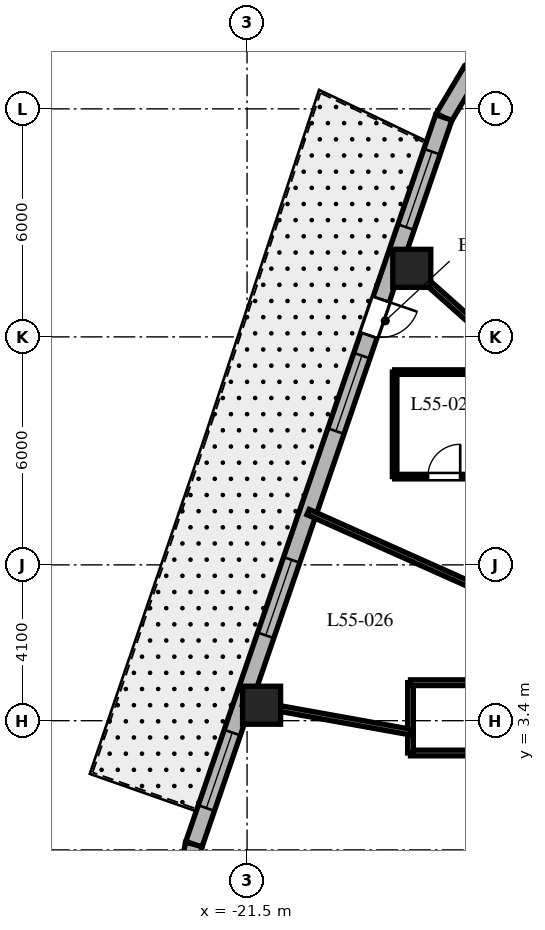
"""IFC4 building model, lengths in metres.
Left out: names, types, materials, properties, quantities, classifications, styles, units other than length and angle.
Written with IfcOpenShell. Run it as: python <this file> out.ifc"""

import sys

from ifc_helpers import new_model, si_unit, direction, frame, frame_2d, origin, origin_2d, place, context, subcontext, project, spatial, rectangle, extrude, element, fill, save


model = new_model("IFC4")
c1 = context("Model", 3, precision=1e-05, world=origin(), true_north=direction((0.0, 1.0)))
c2 = subcontext(c1, "Body", "Model", "MODEL_VIEW")
j1 = project(units=[si_unit("LENGTHUNIT", "METRE"), si_unit("PLANEANGLEUNIT", "RADIAN")], contexts=[c1])
p1 = place(None, origin())
s1 = spatial("IfcSite", under=j1, at=p1, CompositionType="ELEMENT")
p2 = place(p1, origin())
s2 = spatial("IfcBuilding", under=s1, at=p2, CompositionType="ELEMENT")
p3 = place(p2, frame((0.0, 0.0, 221.7)))
s3 = spatial("IfcBuildingStorey", under=s2, at=p3, CompositionType="ELEMENT", Elevation=221.7)
for number, where, z_axis, x_axis in (
    (1, (-17.166, 15.304, 0.0), (0.0, 0.0, 1.0), (1.0, 0.0, 0.0)),
    (2, (-21.118, 3.807, 0.0), (0.0, 0.0, 1.0), (1.0, 0.0, 0.0)),
):
    element("IfcColumn", number, at=place(p3, frame(where, z_axis=z_axis, x_axis=x_axis)), inside=s3, PredefinedType="COLUMN", context=c2, shape_type="SweptSolid", body=[
        extrude(rectangle(XDim=1.0, YDim=1.0, at=origin_2d()), origin(), (0.0, 0.0, 1.0), 3.8),
    ])
p4 = place(p3, frame((-15.604, 20.483, 0.0), z_axis=(0.0, 0.0, 1.0), x_axis=(-0.512222149036, -0.858852996756, 0.0)))
e3 = element("IfcWall", 3, at=p4, inside=s3, PredefinedType="SOLIDWALL", context=c2, shape_type="SweptSolid", body=[
    extrude(rectangle(XDim=1.406, YDim=0.45, at=frame_2d((0.703, 0.0))), origin(), (0.0, 0.0, 1.0), 3.5),
])
p5 = place(p3, frame((-22.898, 0.15, 0.0), z_axis=(0.0, 0.0, 1.0), x_axis=(-0.199055826889, -0.979988151858, 0.0)))
e4 = element("IfcWall", 4, at=p5, inside=s3, PredefinedType="SOLIDWALL", context=c2, shape_type="SweptSolid", body=[
    extrude(rectangle(XDim=0.894, YDim=0.45, at=frame_2d((0.447, 0.0))), origin(), (0.0, 0.0, 1.0), 3.5),
])
p6 = place(p3, frame((-16.324, 19.275, 0.0), z_axis=(0.0, 0.0, 1.0), x_axis=(-0.325083142304, -0.945685439557, 0.0)))
e5 = element("IfcWall", 5, at=p6, inside=s3, PredefinedType="SOLIDWALL", context=c2, shape_type="SweptSolid", body=[
    extrude(rectangle(XDim=20.224, YDim=0.45, at=frame_2d((10.112, 0.0))), origin(), (0.0, 0.0, 1.0), 3.5),
])
p7 = place(p6, frame((5.062, 0.0, 0.0)))
e6 = element("IfcOpeningElement", 6, at=p7, cuts=e5, PredefinedType="OPENING", context=c2, shape_type="SweptSolid", body=[
    extrude(rectangle(XDim=1.0, YDim=2.15, at=frame_2d((0.5, 1.075))), frame((0.0, 0.235, 0.0), z_axis=(0.0, -1.0, 0.0), x_axis=(1.0, 0.0, 0.0)), (0.0, 0.0, 1.0), 0.47),
])
p8 = place(p6, frame((0.953, 0.0, 0.8)))
e7 = element("IfcOpeningElement", 7, at=p8, cuts=e5, PredefinedType="OPENING", context=c2, shape_type="SweptSolid", body=[
    extrude(rectangle(XDim=2.1, YDim=1.85, at=frame_2d((1.05, 0.925))), frame((0.0, 0.235, 0.0), z_axis=(0.0, -1.0, 0.0), x_axis=(1.0, 0.0, 0.0)), (0.0, 0.0, 1.0), 0.47),
])
p9 = place(p6, frame((6.629, 0.0, 0.8)))
e8 = element("IfcOpeningElement", 8, at=p9, cuts=e5, PredefinedType="OPENING", context=c2, shape_type="SweptSolid", body=[
    extrude(rectangle(XDim=2.1, YDim=1.85, at=frame_2d((1.05, 0.925))), frame((0.0, 0.235, 0.0), z_axis=(0.0, -1.0, 0.0), x_axis=(1.0, 0.0, 0.0)), (0.0, 0.0, 1.0), 0.47),
])
p10 = place(p6, frame((12.312, 0.0, 0.8)))
e9 = element("IfcOpeningElement", 9, at=p10, cuts=e5, PredefinedType="OPENING", context=c2, shape_type="SweptSolid", body=[
    extrude(rectangle(XDim=2.1, YDim=1.85, at=frame_2d((1.05, 0.925))), frame((0.0, 0.235, 0.0), z_axis=(0.0, -1.0, 0.0), x_axis=(1.0, 0.0, 0.0)), (0.0, 0.0, 1.0), 0.47),
])
p11 = place(p6, frame((17.118, 0.0, 0.8)))
e10 = element("IfcOpeningElement", 10, at=p11, cuts=e5, PredefinedType="OPENING", context=c2, shape_type="SweptSolid", body=[
    extrude(rectangle(XDim=2.1, YDim=1.85, at=frame_2d((1.05, 0.925))), frame((0.0, 0.235, 0.0), z_axis=(0.0, -1.0, 0.0), x_axis=(1.0, 0.0, 0.0)), (0.0, 0.0, 1.0), 0.47),
])
p12 = place(p3, frame((-11.35, 2.55, 0.0), z_axis=(0.0, 0.0, 1.0), x_axis=(-1.0, 0.0, 0.0)))
e11 = element("IfcWall", 11, at=p12, inside=s3, PredefinedType="PARTITIONING", context=c2, shape_type="SweptSolid", body=[
    extrude(rectangle(XDim=5.85, YDim=0.15, at=frame_2d((2.925, 0.0))), origin(), (0.0, 0.0, 1.0), 2.94),
])
p13 = place(p3, frame((-17.2, 2.55, 0.0), z_axis=(0.0, 0.0, 1.0), x_axis=(0.0, 1.0, 0.0)))
e12 = element("IfcWall", 12, at=p13, inside=s3, PredefinedType="PARTITIONING", context=c2, shape_type="SweptSolid", body=[
    extrude(rectangle(XDim=1.85, YDim=0.15, at=frame_2d((0.925, 0.0))), origin(), (0.0, 0.0, 1.0), 2.94),
])
p14 = place(p3, frame((-17.2, 4.4, 0.0), z_axis=(0.0, 0.0, 1.0), x_axis=(1.0, 0.0, 0.0)))
e13 = element("IfcWall", 13, at=p14, inside=s3, PredefinedType="PARTITIONING", context=c2, shape_type="SweptSolid", body=[
    extrude(rectangle(XDim=5.85, YDim=0.15, at=frame_2d((2.925, 0.0))), origin(), (0.0, 0.0, 1.0), 2.94),
])
p15 = place(p14, frame((2.475, 0.0, 0.0)))
e14 = element("IfcOpeningElement", 14, at=p15, cuts=e13, PredefinedType="OPENING", context=c2, shape_type="SweptSolid", body=[
    extrude(rectangle(XDim=0.9, YDim=2.03, at=frame_2d((0.45, 1.015))), frame((0.0, 0.085, 0.0), z_axis=(0.0, -1.0, 0.0), x_axis=(1.0, 0.0, 0.0)), (0.0, 0.0, 1.0), 0.17),
])
p16 = place(p3, frame((-11.048, 9.85, 0.0), z_axis=(0.0, 0.0, 1.0), x_axis=(-0.746444434655, 0.665447748492, 0.0)))
e15 = element("IfcWall", 15, at=p16, inside=s3, PredefinedType="PARTITIONING", context=c2, shape_type="SweptSolid", body=[
    extrude(rectangle(XDim=8.732, YDim=0.15, at=frame_2d((4.366, 0.0))), origin(), (0.0, 0.0, 1.0), 2.74),
])
p17 = place(p3, frame((-11.35, 5.072, 0.0), z_axis=(0.0, 0.0, 1.0), x_axis=(-0.912980177983, 0.408003914944, 0.0)))
e16 = element("IfcWall", 16, at=p17, inside=s3, PredefinedType="PARTITIONING", context=c2, shape_type="SweptSolid", body=[
    extrude(rectangle(XDim=9.358, YDim=0.15, at=frame_2d((4.679, 0.0))), origin(), (0.0, 0.0, 1.0), 2.74),
])
p18 = place(p3, frame((-17.2, 3.101, 0.0), z_axis=(0.0, 0.0, 1.0), x_axis=(-0.98413465883, 0.177423147559, 0.0)))
e17 = element("IfcWall", 17, at=p18, inside=s3, PredefinedType="PARTITIONING", context=c2, shape_type="SweptSolid", body=[
    extrude(rectangle(XDim=4.482, YDim=0.15, at=frame_2d((2.241, 0.0))), origin(), (0.0, 0.0, 1.0), 2.74),
])
p19 = place(p3, frame((-17.617, 9.823, 0.0), z_axis=(0.0, 0.0, 1.0), x_axis=(1.0, 0.0, 0.0)))
e18 = element("IfcWall", 18, at=p19, inside=s3, PredefinedType="PARTITIONING", context=c2, shape_type="SweptSolid", body=[
    extrude(rectangle(XDim=2.6, YDim=0.12, at=frame_2d((1.3, 0.0))), origin(), (0.0, 0.0, 1.0), 3.073),
])
p20 = place(p19, frame((0.875, 0.0, 0.0)))
e19 = element("IfcOpeningElement", 19, at=p20, cuts=e18, PredefinedType="OPENING", context=c2, shape_type="SweptSolid", body=[
    extrude(rectangle(XDim=0.85, YDim=2.03, at=frame_2d((0.425, 1.015))), frame((0.0, 0.07, 0.0), z_axis=(0.0, -1.0, 0.0), x_axis=(1.0, 0.0, 0.0)), (0.0, 0.0, 1.0), 0.14),
])
p21 = place(p3, frame((-15.017, 12.573, 0.0), z_axis=(0.0, 0.0, 1.0), x_axis=(-1.0, 0.0, 0.0)))
e20 = element("IfcWall", 20, at=p21, inside=s3, PredefinedType="PARTITIONING", context=c2, shape_type="SweptSolid", body=[
    extrude(rectangle(XDim=2.6, YDim=0.12, at=frame_2d((1.3, 0.0))), origin(), (0.0, 0.0, 1.0), 3.5),
])
p22 = place(p3, frame((-17.617, 12.573, 0.0), z_axis=(0.0, 0.0, 1.0), x_axis=(0.0, -1.0, 0.0)))
e21 = element("IfcWall", 21, at=p22, inside=s3, PredefinedType="PARTITIONING", context=c2, shape_type="SweptSolid", body=[
    extrude(rectangle(XDim=2.75, YDim=0.12, at=frame_2d((1.375, 0.0))), origin(), (0.0, 0.0, 1.0), 3.5),
])
p23 = place(p7, origin())
e22 = element("IfcDoor", 22, at=p23, inside=s3, OperationType="SINGLE_SWING_LEFT", PredefinedType="DOOR", context=c2, shape_type="SweptSolid", body=[
    extrude(rectangle(XDim=1.0, YDim=2.15, at=frame_2d((0.5, 1.075))), frame((0.0, 0.025, 0.0), z_axis=(0.0, -1.0, 0.0), x_axis=(1.0, 0.0, 0.0)), (0.0, 0.0, 1.0), 0.05),
])
fill(e6, e22)
p24 = place(p8, origin())
e23 = element("IfcWindow", 23, at=p24, inside=s3, PartitioningType="SINGLE_PANEL", PredefinedType="WINDOW", context=c2, shape_type="SweptSolid", body=[
    extrude(rectangle(XDim=2.1, YDim=1.85, at=frame_2d((1.05, 0.925))), frame((0.0, 0.03, 0.0), z_axis=(0.0, -1.0, 0.0), x_axis=(1.0, 0.0, 0.0)), (0.0, 0.0, 1.0), 0.06),
])
fill(e7, e23)
p25 = place(p9, origin())
e24 = element("IfcWindow", 24, at=p25, inside=s3, PartitioningType="SINGLE_PANEL", PredefinedType="WINDOW", context=c2, shape_type="SweptSolid", body=[
    extrude(rectangle(XDim=2.1, YDim=1.85, at=frame_2d((1.05, 0.925))), frame((0.0, 0.03, 0.0), z_axis=(0.0, -1.0, 0.0), x_axis=(1.0, 0.0, 0.0)), (0.0, 0.0, 1.0), 0.06),
])
fill(e8, e24)
p26 = place(p10, origin())
e25 = element("IfcWindow", 25, at=p26, inside=s3, PartitioningType="SINGLE_PANEL", PredefinedType="WINDOW", context=c2, shape_type="SweptSolid", body=[
    extrude(rectangle(XDim=2.1, YDim=1.85, at=frame_2d((1.05, 0.925))), frame((0.0, 0.03, 0.0), z_axis=(0.0, -1.0, 0.0), x_axis=(1.0, 0.0, 0.0)), (0.0, 0.0, 1.0), 0.06),
])
fill(e9, e25)
p27 = place(p11, origin())
e26 = element("IfcWindow", 26, at=p27, inside=s3, PartitioningType="SINGLE_PANEL", PredefinedType="WINDOW", context=c2, shape_type="SweptSolid", body=[
    extrude(rectangle(XDim=2.1, YDim=1.85, at=frame_2d((1.05, 0.925))), frame((0.0, 0.03, 0.0), z_axis=(0.0, -1.0, 0.0), x_axis=(1.0, 0.0, 0.0)), (0.0, 0.0, 1.0), 0.06),
])
fill(e10, e26)
p28 = place(p20, origin())
e27 = element("IfcDoor", 27, at=p28, inside=s3, OperationType="SINGLE_SWING_RIGHT", PredefinedType="DOOR", context=c2, shape_type="SweptSolid", body=[
    extrude(rectangle(XDim=0.85, YDim=2.03, at=frame_2d((0.425, 1.015))), frame((0.0, 0.025, 0.0), z_axis=(0.0, -1.0, 0.0), x_axis=(1.0, 0.0, 0.0)), (0.0, 0.0, 1.0), 0.05),
])
fill(e19, e27)
save(model, sys.argv[1])
